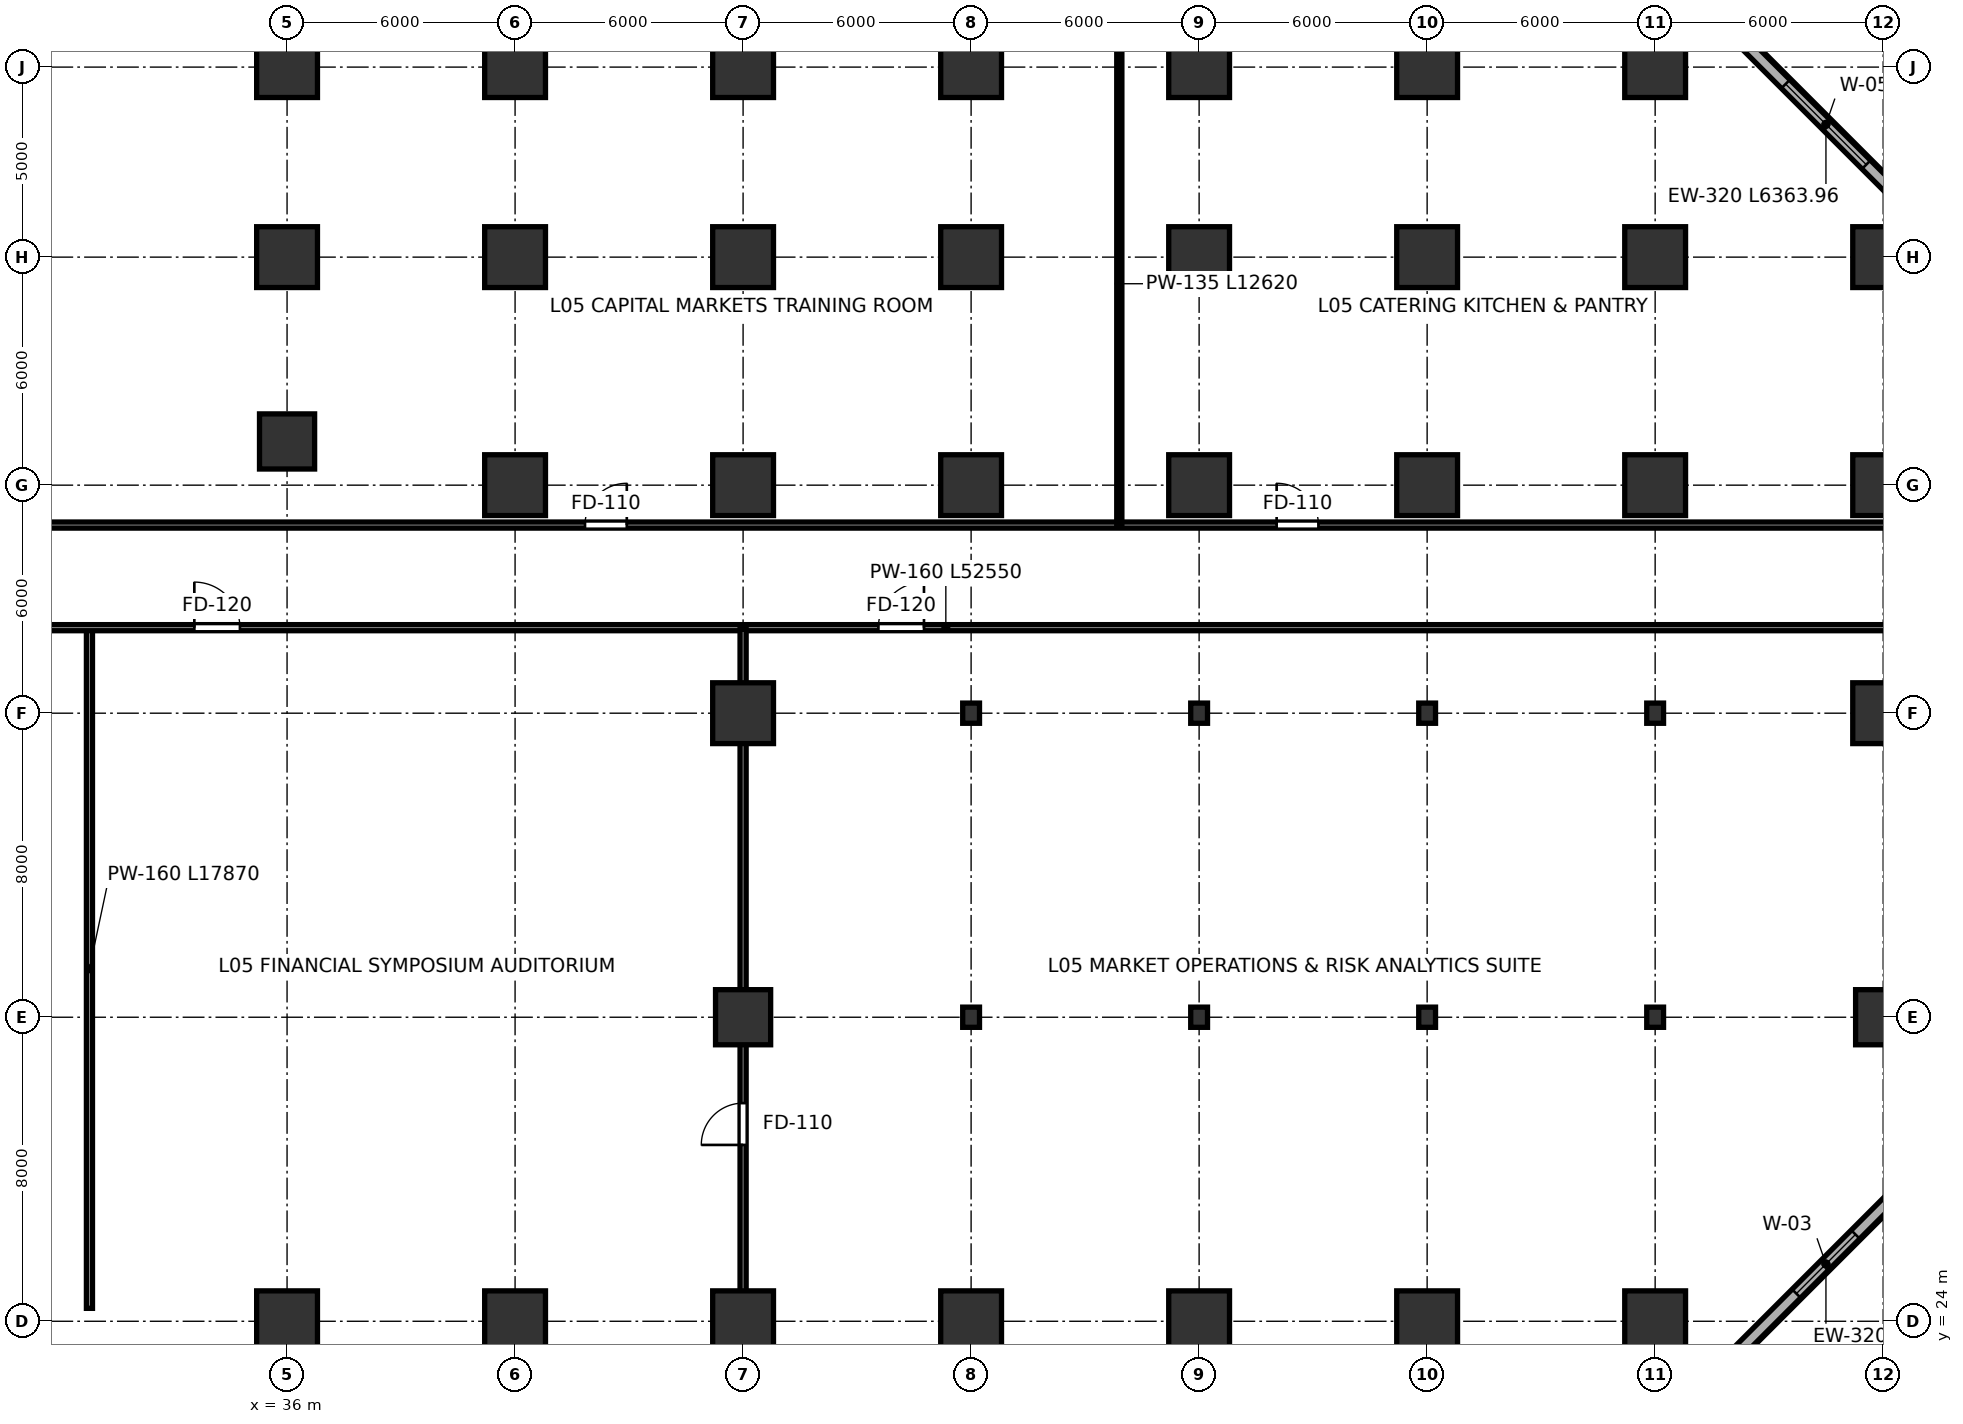
"""IFC4 building model, lengths in metres.
Left out: names, types, materials, properties, quantities, classifications, styles, units other than length and angle.
Written with IfcOpenShell. Run it as: python <this file> out.ifc"""

import sys

from ifc_helpers import new_model, si_unit, direction, frame, frame_2d, origin, origin_2d, place, context, subcontext, project, spatial, rectangle, i_section, extrude, source, transform, mapped, element, fill, save


model = new_model("IFC4")
c1 = context("Model", 3, precision=1e-05, world=origin(), true_north=direction((0.0, 1.0)))
c2 = subcontext(c1, "Body", "Model", "MODEL_VIEW")
j1 = project(units=[si_unit("LENGTHUNIT", "METRE"), si_unit("PLANEANGLEUNIT", "RADIAN")], contexts=[c1])
p1 = place(None, origin())
s1 = spatial("IfcSite", under=j1, at=p1, CompositionType="ELEMENT")
p2 = place(p1, origin())
s2 = spatial("IfcBuilding", under=s1, at=p2, CompositionType="ELEMENT")
p3 = place(p2, frame((0.0, 0.0, 22.2)))
s3 = spatial("IfcBuildingStorey", under=s2, at=p3, CompositionType="ELEMENT", Elevation=22.2)
m1 = source(origin(), c2, "Body", "SweptSolid", [
    extrude(rectangle(XDim=1.6, YDim=1.6, at=origin_2d()), origin(), (0.0, 0.0, 1.0), 5.799),
])
p4 = place(p3, frame((36.0, 24.0, 0.001), z_axis=(0.0, 0.0, 1.0), x_axis=(1.0, 0.0, 0.0)))
e1 = element("IfcColumn", 1, at=p4, inside=s3, PredefinedType="COLUMN", context=c2, shape_type="MappedRepresentation", body=[
    mapped(m1, transform((0.0, 0.0, 0.0), scale=1.0)),
])
m2 = source(origin(), c2, "Body", "SweptSolid", [
    extrude(rectangle(XDim=1.6, YDim=1.6, at=origin_2d()), origin(), (0.0, 0.0, 1.0), 5.799),
])
p5 = place(p3, frame((36.0, 52.0, 0.001), z_axis=(0.0, 0.0, 1.0), x_axis=(1.0, 0.0, 0.0)))
e2 = element("IfcColumn", 2, at=p5, inside=s3, PredefinedType="COLUMN", context=c2, shape_type="MappedRepresentation", body=[
    mapped(m2, transform((0.0, 0.0, 0.0), scale=1.0)),
])
p6 = place(p3, frame((36.0, 57.0, 0.001), z_axis=(0.0, 0.0, 1.0), x_axis=(1.0, 0.0, 0.0)))
e3 = element("IfcColumn", 3, at=p6, inside=s3, PredefinedType="COLUMN", context=c2, shape_type="MappedRepresentation", body=[
    mapped(m1, transform((0.0, 0.0, 0.0), scale=1.0)),
])
m3 = source(origin(), c2, "Body", "SweptSolid", [
    extrude(rectangle(XDim=1.45, YDim=1.45, at=origin_2d()), origin(), (0.0, 0.0, 1.0), 5.799),
])
p7 = place(p3, frame((36.0, 47.15, 0.001), z_axis=(0.0, 0.0, 1.0), x_axis=(1.0, 0.0, 0.0)))
e4 = element("IfcColumn", 4, at=p7, inside=s3, PredefinedType="COLUMN", context=c2, shape_type="MappedRepresentation", body=[
    mapped(m3, transform((0.0, 0.0, 0.0), scale=1.0)),
])
p8 = place(p3, frame((42.0, 24.0, 0.001), z_axis=(0.0, 0.0, 1.0), x_axis=(1.0, 0.0, 0.0)))
e5 = element("IfcColumn", 5, at=p8, inside=s3, PredefinedType="COLUMN", context=c2, shape_type="MappedRepresentation", body=[
    mapped(m1, transform((0.0, 0.0, 0.0), scale=1.0)),
])
for number, where, z_axis, x_axis in (
    (6, (42.0, 46.0, 0.001), (0.0, 0.0, 1.0), (1.0, 0.0, 0.0)),
    (7, (42.0, 52.0, 0.001), (0.0, 0.0, 1.0), (1.0, 0.0, 0.0)),
):
    element("IfcColumn", number, at=place(p3, frame(where, z_axis=z_axis, x_axis=x_axis)), inside=s3, PredefinedType="COLUMN", context=c2, shape_type="MappedRepresentation", body=[
        mapped(m2, transform((0.0, 0.0, 0.0), scale=1.0)),
    ])
for number, where, z_axis, x_axis in (
    (8, (42.0, 57.0, 0.001), (0.0, 0.0, 1.0), (1.0, 0.0, 0.0)),
    (9, (48.0, 24.0, 0.001), (0.0, 0.0, 1.0), (1.0, 0.0, 0.0)),
):
    element("IfcColumn", number, at=place(p3, frame(where, z_axis=z_axis, x_axis=x_axis)), inside=s3, PredefinedType="COLUMN", context=c2, shape_type="MappedRepresentation", body=[
        mapped(m1, transform((0.0, 0.0, 0.0), scale=1.0)),
    ])
p9 = place(p3, frame((48.0, 32.0, 0.001), z_axis=(0.0, 0.0, 1.0), x_axis=(1.0, 0.0, 0.0)))
e10 = element("IfcColumn", 10, at=p9, inside=s3, PredefinedType="COLUMN", context=c2, shape_type="MappedRepresentation", body=[
    mapped(m3, transform((0.0, 0.0, 0.0), scale=1.0)),
])
for number, where, z_axis, x_axis in (
    (11, (48.0, 40.0, 0.001), (0.0, 0.0, 1.0), (1.0, 0.0, 0.0)),
    (12, (48.0, 46.0, 0.001), (0.0, 0.0, 1.0), (1.0, 0.0, 0.0)),
    (13, (48.0, 52.0, 0.001), (0.0, 0.0, 1.0), (1.0, 0.0, 0.0)),
):
    element("IfcColumn", number, at=place(p3, frame(where, z_axis=z_axis, x_axis=x_axis)), inside=s3, PredefinedType="COLUMN", context=c2, shape_type="MappedRepresentation", body=[
        mapped(m2, transform((0.0, 0.0, 0.0), scale=1.0)),
    ])
for number, where, z_axis, x_axis in (
    (14, (48.0, 57.0, 0.001), (0.0, 0.0, 1.0), (1.0, 0.0, 0.0)),
    (15, (54.0, 24.0, 0.001), (0.0, 0.0, 1.0), (1.0, 0.0, 0.0)),
):
    element("IfcColumn", number, at=place(p3, frame(where, z_axis=z_axis, x_axis=x_axis)), inside=s3, PredefinedType="COLUMN", context=c2, shape_type="MappedRepresentation", body=[
        mapped(m1, transform((0.0, 0.0, 0.0), scale=1.0)),
    ])
m4 = source(origin(), c2, "Body", "SweptSolid", [
    extrude(i_section(OverallWidth=0.442, OverallDepth=0.531, WebThickness=0.066, FlangeThickness=0.106, FilletRadius=0.015, at=origin_2d()), origin(), (0.0, 0.0, 1.0), 5.799),
])
for number, where, z_axis, x_axis in (
    (16, (54.0, 32.0, 0.001), (0.0, 0.0, 1.0), (1.0, 0.0, 0.0)),
    (17, (54.0, 40.0, 0.001), (0.0, 0.0, 1.0), (1.0, 0.0, 0.0)),
):
    element("IfcColumn", number, at=place(p3, frame(where, z_axis=z_axis, x_axis=x_axis)), inside=s3, PredefinedType="COLUMN", context=c2, shape_type="MappedRepresentation", body=[
        mapped(m4, transform((0.0, 0.0, 0.0), scale=1.0)),
    ])
for number, where, z_axis, x_axis in (
    (18, (54.0, 46.0, 0.001), (0.0, 0.0, 1.0), (1.0, 0.0, 0.0)),
    (19, (54.0, 52.0, 0.001), (0.0, 0.0, 1.0), (1.0, 0.0, 0.0)),
):
    element("IfcColumn", number, at=place(p3, frame(where, z_axis=z_axis, x_axis=x_axis)), inside=s3, PredefinedType="COLUMN", context=c2, shape_type="MappedRepresentation", body=[
        mapped(m2, transform((0.0, 0.0, 0.0), scale=1.0)),
    ])
for number, where, z_axis, x_axis in (
    (20, (54.0, 57.0, 0.001), (0.0, 0.0, 1.0), (1.0, 0.0, 0.0)),
    (21, (60.0, 24.0, 0.001), (0.0, 0.0, 1.0), (1.0, 0.0, 0.0)),
):
    element("IfcColumn", number, at=place(p3, frame(where, z_axis=z_axis, x_axis=x_axis)), inside=s3, PredefinedType="COLUMN", context=c2, shape_type="MappedRepresentation", body=[
        mapped(m1, transform((0.0, 0.0, 0.0), scale=1.0)),
    ])
for number, where, z_axis, x_axis in (
    (22, (60.0, 32.0, 0.001), (0.0, 0.0, 1.0), (1.0, 0.0, 0.0)),
    (23, (60.0, 40.0, 0.001), (0.0, 0.0, 1.0), (1.0, 0.0, 0.0)),
):
    element("IfcColumn", number, at=place(p3, frame(where, z_axis=z_axis, x_axis=x_axis)), inside=s3, PredefinedType="COLUMN", context=c2, shape_type="MappedRepresentation", body=[
        mapped(m4, transform((0.0, 0.0, 0.0), scale=1.0)),
    ])
for number, where, z_axis, x_axis in (
    (24, (60.0, 46.0, 0.001), (0.0, 0.0, 1.0), (1.0, 0.0, 0.0)),
    (25, (60.0, 52.0, 0.001), (0.0, 0.0, 1.0), (1.0, 0.0, 0.0)),
):
    element("IfcColumn", number, at=place(p3, frame(where, z_axis=z_axis, x_axis=x_axis)), inside=s3, PredefinedType="COLUMN", context=c2, shape_type="MappedRepresentation", body=[
        mapped(m2, transform((0.0, 0.0, 0.0), scale=1.0)),
    ])
for number, where, z_axis, x_axis in (
    (26, (60.0, 57.0, 0.001), (0.0, 0.0, 1.0), (1.0, 0.0, 0.0)),
    (27, (66.0, 24.0, 0.001), (0.0, 0.0, 1.0), (1.0, 0.0, 0.0)),
):
    element("IfcColumn", number, at=place(p3, frame(where, z_axis=z_axis, x_axis=x_axis)), inside=s3, PredefinedType="COLUMN", context=c2, shape_type="MappedRepresentation", body=[
        mapped(m1, transform((0.0, 0.0, 0.0), scale=1.0)),
    ])
for number, where, z_axis, x_axis in (
    (28, (66.0, 32.0, 0.001), (0.0, 0.0, 1.0), (1.0, 0.0, 0.0)),
    (29, (66.0, 40.0, 0.001), (0.0, 0.0, 1.0), (1.0, 0.0, 0.0)),
):
    element("IfcColumn", number, at=place(p3, frame(where, z_axis=z_axis, x_axis=x_axis)), inside=s3, PredefinedType="COLUMN", context=c2, shape_type="MappedRepresentation", body=[
        mapped(m4, transform((0.0, 0.0, 0.0), scale=1.0)),
    ])
for number, where, z_axis, x_axis in (
    (30, (66.0, 46.0, 0.001), (0.0, 0.0, 1.0), (1.0, 0.0, 0.0)),
    (31, (66.0, 52.0, 0.001), (0.0, 0.0, 1.0), (1.0, 0.0, 0.0)),
):
    element("IfcColumn", number, at=place(p3, frame(where, z_axis=z_axis, x_axis=x_axis)), inside=s3, PredefinedType="COLUMN", context=c2, shape_type="MappedRepresentation", body=[
        mapped(m2, transform((0.0, 0.0, 0.0), scale=1.0)),
    ])
for number, where, z_axis, x_axis in (
    (32, (66.0, 57.0, 0.001), (0.0, 0.0, 1.0), (1.0, 0.0, 0.0)),
    (33, (72.0, 24.0, 0.001), (0.0, 0.0, 1.0), (1.0, 0.0, 0.0)),
):
    element("IfcColumn", number, at=place(p3, frame(where, z_axis=z_axis, x_axis=x_axis)), inside=s3, PredefinedType="COLUMN", context=c2, shape_type="MappedRepresentation", body=[
        mapped(m1, transform((0.0, 0.0, 0.0), scale=1.0)),
    ])
for number, where, z_axis, x_axis in (
    (34, (72.0, 32.0, 0.001), (0.0, 0.0, 1.0), (1.0, 0.0, 0.0)),
    (35, (72.0, 40.0, 0.001), (0.0, 0.0, 1.0), (1.0, 0.0, 0.0)),
):
    element("IfcColumn", number, at=place(p3, frame(where, z_axis=z_axis, x_axis=x_axis)), inside=s3, PredefinedType="COLUMN", context=c2, shape_type="MappedRepresentation", body=[
        mapped(m4, transform((0.0, 0.0, 0.0), scale=1.0)),
    ])
for number, where, z_axis, x_axis in (
    (36, (72.0, 46.0, 0.001), (0.0, 0.0, 1.0), (1.0, 0.0, 0.0)),
    (37, (72.0, 52.0, 0.001), (0.0, 0.0, 1.0), (1.0, 0.0, 0.0)),
):
    element("IfcColumn", number, at=place(p3, frame(where, z_axis=z_axis, x_axis=x_axis)), inside=s3, PredefinedType="COLUMN", context=c2, shape_type="MappedRepresentation", body=[
        mapped(m2, transform((0.0, 0.0, 0.0), scale=1.0)),
    ])
p10 = place(p3, frame((72.0, 57.0, 0.001), z_axis=(0.0, 0.0, 1.0), x_axis=(1.0, 0.0, 0.0)))
e38 = element("IfcColumn", 38, at=p10, inside=s3, PredefinedType="COLUMN", context=c2, shape_type="MappedRepresentation", body=[
    mapped(m1, transform((0.0, 0.0, 0.0), scale=1.0)),
])
m5 = source(origin(), c2, "Body", "SweptSolid", [
    extrude(rectangle(XDim=1.45, YDim=1.45, at=origin_2d()), origin(), (0.0, 0.0, 1.0), 5.799),
])
p11 = place(p3, frame((78.0, 32.0, 0.001), z_axis=(0.0, 0.0, 1.0), x_axis=(1.0, 0.0, 0.0)))
e39 = element("IfcColumn", 39, at=p11, inside=s3, PredefinedType="COLUMN", context=c2, shape_type="MappedRepresentation", body=[
    mapped(m5, transform((0.0, 0.0, 0.0), scale=1.0)),
])
for number, where, z_axis, x_axis in (
    (40, (78.0, 40.0, 0.001), (0.0, 0.0, 1.0), (1.0, 0.0, 0.0)),
    (41, (78.0, 46.0, 0.001), (0.0, 0.0, 1.0), (1.0, 0.0, 0.0)),
    (42, (78.0, 52.0, 0.001), (0.0, 0.0, 1.0), (1.0, 0.0, 0.0)),
):
    element("IfcColumn", number, at=place(p3, frame(where, z_axis=z_axis, x_axis=x_axis)), inside=s3, PredefinedType="COLUMN", context=c2, shape_type="MappedRepresentation", body=[
        mapped(m1, transform((0.0, 0.0, 0.0), scale=1.0)),
    ])
p12 = place(p3, frame((74.244, 23.256, 0.0), z_axis=(0.0, 0.0, 1.0), x_axis=(0.707106781187, 0.707106781187, 0.0)))
e43 = element("IfcWall", 43, at=p12, inside=s3, PredefinedType="SOLIDWALL", context=c2, shape_type="SweptSolid", body=[
    extrude(rectangle(XDim=6.364, YDim=0.32, at=frame_2d((3.182, 0.0))), origin(), (0.0, 0.0, 1.0), 5.52),
])
p13 = place(p12, frame((2.082, 0.0, 0.65)))
e44 = element("IfcOpeningElement", 44, at=p13, cuts=e43, PredefinedType="OPENING", context=c2, shape_type="SweptSolid", body=[
    extrude(rectangle(XDim=2.2, YDim=2.2, at=frame_2d((1.1, 1.1))), frame((0.0, 0.17, 0.0), z_axis=(0.0, -1.0, 0.0), x_axis=(1.0, 0.0, 0.0)), (0.0, 0.0, 1.0), 0.34),
])
p14 = place(p3, frame((78.744, 53.244, 0.0), z_axis=(0.0, 0.0, 1.0), x_axis=(-0.707106781187, 0.707106781187, 0.0)))
e45 = element("IfcWall", 45, at=p14, inside=s3, PredefinedType="SOLIDWALL", context=c2, shape_type="SweptSolid", body=[
    extrude(rectangle(XDim=6.364, YDim=0.32, at=frame_2d((3.182, 0.0))), origin(), (0.0, 0.0, 1.0), 5.52),
])
p15 = place(p14, frame((1.682, 0.0, 0.65)))
e46 = element("IfcOpeningElement", 46, at=p15, cuts=e45, PredefinedType="OPENING", context=c2, shape_type="SweptSolid", body=[
    extrude(rectangle(XDim=3.0, YDim=2.4, at=frame_2d((1.5, 1.2))), frame((0.0, 0.17, 0.0), z_axis=(0.0, -1.0, 0.0), x_axis=(1.0, 0.0, 0.0)), (0.0, 0.0, 1.0), 0.34),
])
p16 = place(p3, frame((30.8, 24.34, 0.0), z_axis=(0.0, 0.0, 1.0), x_axis=(0.0, 1.0, 0.0)))
e47 = element("IfcWall", 47, at=p16, inside=s3, PredefinedType="PARTITIONING", context=c2, shape_type="SweptSolid", body=[
    extrude(rectangle(XDim=17.87, YDim=0.16, at=frame_2d((8.935, 0.0))), origin(), (0.0, 0.0, 1.0), 3.805),
])
p17 = place(p3, frame((27.06, 42.25, 0.0), z_axis=(0.0, 0.0, 1.0), x_axis=(1.0, 0.0, 0.0)))
e48 = element("IfcWall", 48, at=p17, inside=s3, PredefinedType="PARTITIONING", context=c2, shape_type="SweptSolid", body=[
    extrude(rectangle(XDim=52.55, YDim=0.16, at=frame_2d((26.275, 0.0))), origin(), (0.0, 0.0, 1.0), 4.655),
])
p18 = place(p17, frame((6.5, 0.0, 0.0)))
e49 = element("IfcOpeningElement", 49, at=p18, cuts=e48, PredefinedType="OPENING", context=c2, shape_type="SweptSolid", body=[
    extrude(rectangle(XDim=1.2, YDim=2.2, at=frame_2d((0.6, 1.1))), frame((0.0, 0.09, 0.0), z_axis=(0.0, -1.0, 0.0), x_axis=(1.0, 0.0, 0.0)), (0.0, 0.0, 1.0), 0.18),
])
p19 = place(p17, frame((24.5, 0.0, 0.0)))
e50 = element("IfcOpeningElement", 50, at=p19, cuts=e48, PredefinedType="OPENING", context=c2, shape_type="SweptSolid", body=[
    extrude(rectangle(XDim=1.2, YDim=2.2, at=frame_2d((0.6, 1.1))), frame((0.0, 0.09, 0.0), z_axis=(0.0, -1.0, 0.0), x_axis=(1.0, 0.0, 0.0)), (0.0, 0.0, 1.0), 0.18),
])
p20 = place(p3, frame((27.14, 44.95, 0.0), z_axis=(0.0, 0.0, 1.0), x_axis=(1.0, 0.0, 0.0)))
e51 = element("IfcWall", 51, at=p20, inside=s3, PredefinedType="PARTITIONING", context=c2, shape_type="SweptSolid", body=[
    extrude(rectangle(XDim=52.47, YDim=0.16, at=frame_2d((26.235, 0.0))), origin(), (0.0, 0.0, 1.0), 4.655),
])
p21 = place(p20, frame((16.7, 0.0, 0.0)))
e52 = element("IfcOpeningElement", 52, at=p21, cuts=e51, PredefinedType="OPENING", context=c2, shape_type="SweptSolid", body=[
    extrude(rectangle(XDim=1.1, YDim=2.2, at=frame_2d((0.55, 1.1))), frame((0.0, 0.09, 0.0), z_axis=(0.0, -1.0, 0.0), x_axis=(1.0, 0.0, 0.0)), (0.0, 0.0, 1.0), 0.18),
])
p22 = place(p20, frame((34.9, 0.0, 0.0)))
e53 = element("IfcOpeningElement", 53, at=p22, cuts=e51, PredefinedType="OPENING", context=c2, shape_type="SweptSolid", body=[
    extrude(rectangle(XDim=1.1, YDim=2.2, at=frame_2d((0.55, 1.1))), frame((0.0, 0.09, 0.0), z_axis=(0.0, -1.0, 0.0), x_axis=(1.0, 0.0, 0.0)), (0.0, 0.0, 1.0), 0.18),
])
p23 = place(p3, frame((57.9, 44.99, 0.0), z_axis=(0.0, 0.0, 1.0), x_axis=(0.0, 1.0, 0.0)))
e54 = element("IfcWall", 54, at=p23, inside=s3, PredefinedType="PARTITIONING", context=c2, shape_type="SweptSolid", body=[
    extrude(rectangle(XDim=12.62, YDim=0.135, at=frame_2d((6.31, 0.0))), origin(), (0.0, 0.0, 1.0), 4.655),
])
p24 = place(p3, frame((48.0, 24.44, 0.0), z_axis=(0.0, 0.0, 1.0), x_axis=(0.0, 1.0, 0.0)))
e55 = element("IfcWall", 55, at=p24, inside=s3, PredefinedType="PARTITIONING", context=c2, shape_type="SweptSolid", body=[
    extrude(rectangle(XDim=17.77, YDim=0.16, at=frame_2d((8.885, 0.0))), origin(), (0.0, 0.0, 1.0), 3.805),
])
p25 = place(p24, frame((4.2, 0.0, 0.0)))
e56 = element("IfcOpeningElement", 56, at=p25, cuts=e55, PredefinedType="OPENING", context=c2, shape_type="SweptSolid", body=[
    extrude(rectangle(XDim=1.1, YDim=2.2, at=frame_2d((0.55, 1.1))), frame((0.0, 0.09, 0.0), z_axis=(0.0, -1.0, 0.0), x_axis=(1.0, 0.0, 0.0)), (0.0, 0.0, 1.0), 0.18),
])
m6 = source(origin(), c2, "Body", "SweptSolid", [
    extrude(rectangle(XDim=2.2, YDim=2.2, at=frame_2d((1.1, 1.1))), frame((0.0, 0.03, 0.0), z_axis=(0.0, -1.0, 0.0), x_axis=(1.0, 0.0, 0.0)), (0.0, 0.0, 1.0), 0.06),
])
p26 = place(p13, origin())
e57 = element("IfcWindow", 57, at=p26, inside=s3, PartitioningType="SINGLE_PANEL", PredefinedType="WINDOW", context=c2, shape_type="MappedRepresentation", body=[
    mapped(m6, transform((0.0, 0.0, 0.0), scale=1.0)),
])
fill(e44, e57)
m7 = source(origin(), c2, "Body", "SweptSolid", [
    extrude(rectangle(XDim=3.0, YDim=2.4, at=frame_2d((1.5, 1.2))), frame((0.0, 0.03, 0.0), z_axis=(0.0, -1.0, 0.0), x_axis=(1.0, 0.0, 0.0)), (0.0, 0.0, 1.0), 0.06),
])
p27 = place(p15, origin())
e58 = element("IfcWindow", 58, at=p27, inside=s3, PartitioningType="TRIPLE_PANEL_VERTICAL", PredefinedType="WINDOW", context=c2, shape_type="MappedRepresentation", body=[
    mapped(m7, transform((0.0, 0.0, 0.0), scale=1.0)),
])
fill(e46, e58)
m8 = source(origin(), c2, "Body", "SweptSolid", [
    extrude(rectangle(XDim=1.2, YDim=2.2, at=frame_2d((0.6, 1.1))), frame((0.0, 0.025, 0.0), z_axis=(0.0, -1.0, 0.0), x_axis=(1.0, 0.0, 0.0)), (0.0, 0.0, 1.0), 0.05),
])
p28 = place(p18, origin())
e59 = element("IfcDoor", 59, at=p28, inside=s3, OperationType="SINGLE_SWING_LEFT", PredefinedType="DOOR", context=c2, shape_type="MappedRepresentation", body=[
    mapped(m8, transform((0.0, 0.0, 0.0), scale=1.0)),
])
fill(e49, e59)
p29 = place(p19, origin())
e60 = element("IfcDoor", 60, at=p29, inside=s3, OperationType="SINGLE_SWING_RIGHT", PredefinedType="DOOR", context=c2, shape_type="MappedRepresentation", body=[
    mapped(m8, transform((0.0, 0.0, 0.0), scale=1.0)),
])
fill(e50, e60)
m9 = source(origin(), c2, "Body", "SweptSolid", [
    extrude(rectangle(XDim=1.1, YDim=2.2, at=frame_2d((0.55, 1.1))), frame((0.0, 0.025, 0.0), z_axis=(0.0, -1.0, 0.0), x_axis=(1.0, 0.0, 0.0)), (0.0, 0.0, 1.0), 0.05),
])
p30 = place(p21, origin())
e61 = element("IfcDoor", 61, at=p30, inside=s3, OperationType="SINGLE_SWING_RIGHT", PredefinedType="DOOR", context=c2, shape_type="MappedRepresentation", body=[
    mapped(m9, transform((0.0, 0.0, 0.0), scale=1.0)),
])
fill(e52, e61)
p31 = place(p22, origin())
e62 = element("IfcDoor", 62, at=p31, inside=s3, OperationType="SINGLE_SWING_LEFT", PredefinedType="DOOR", context=c2, shape_type="MappedRepresentation", body=[
    mapped(m9, transform((0.0, 0.0, 0.0), scale=1.0)),
])
fill(e53, e62)
p32 = place(p25, origin())
e63 = element("IfcDoor", 63, at=p32, inside=s3, OperationType="SINGLE_SWING_LEFT", PredefinedType="DOOR", context=c2, shape_type="MappedRepresentation", body=[
    mapped(m9, transform((0.0, 0.0, 0.0), scale=1.0)),
])
fill(e56, e63)
save(model, sys.argv[1])
